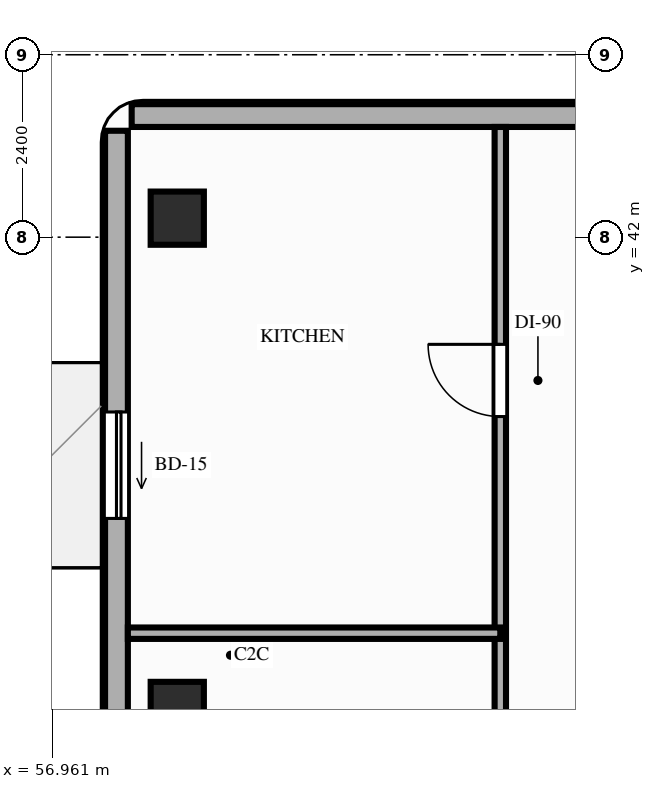
"""IFC4 building model, lengths in metres.
Left out: names, types, materials, properties, quantities, classifications, styles, units other than length and angle.
Written with IfcOpenShell. Run it as: python <this file> out.ifc"""

import sys

from ifc_helpers import new_model, si_unit, direction, frame, frame_2d, origin, origin_2d, place, context, subcontext, project, spatial, rectangle, extrude, element, fill, save


model = new_model("IFC4")
c1 = context("Model", 3, precision=1e-05, world=origin(), true_north=direction((0.0, 1.0)))
c2 = subcontext(c1, "Body", "Model", "MODEL_VIEW")
j1 = project(units=[si_unit("LENGTHUNIT", "METRE"), si_unit("PLANEANGLEUNIT", "RADIAN")], contexts=[c1])
p1 = place(None, origin())
s1 = spatial("IfcSite", under=j1, at=p1, CompositionType="ELEMENT")
p2 = place(p1, origin())
s2 = spatial("IfcBuilding", under=s1, at=p2, CompositionType="ELEMENT")
p3 = place(p2, frame((0.0, 0.0, 89.8)))
s3 = spatial("IfcBuildingStorey", under=s2, at=p3, CompositionType="ELEMENT", Elevation=89.8)
for number, where, z_axis, x_axis in (
    (1, (58.6, 35.8, 0.0), (0.0, 0.0, 1.0), (1.0, 0.0, 0.0)),
    (2, (58.6, 42.25, 0.0), (0.0, 0.0, 1.0), (1.0, 0.0, 0.0)),
):
    element("IfcColumn", number, at=place(p3, frame(where, z_axis=z_axis, x_axis=x_axis)), inside=s3, PredefinedType="COLUMN", context=c2, shape_type="SweptSolid", body=[
        extrude(rectangle(XDim=0.7, YDim=0.7, at=origin_2d()), origin(), (0.0, 0.0, 1.0), 3.2),
    ])
p4 = place(p3, frame((57.8, 43.4, 0.0), z_axis=(0.0, 0.0, 1.0), x_axis=(0.0, -1.0, 0.0)))
e3 = element("IfcWall", 3, at=p4, inside=s3, PredefinedType="STANDARD", context=c2, shape_type="SweptSolid", body=[
    extrude(rectangle(XDim=22.6, YDim=0.3, at=frame_2d((11.3, 0.0))), origin(), (0.0, 0.0, 1.0), 2.73),
])
p5 = place(p4, frame((3.7, 0.0, 0.0)))
e4 = element("IfcOpeningElement", 4, at=p5, cuts=e3, PredefinedType="OPENING", context=c2, shape_type="SweptSolid", body=[
    extrude(rectangle(XDim=1.4, YDim=2.1, at=frame_2d((0.7, 1.05))), frame((0.0, 0.16, 0.0), z_axis=(0.0, -1.0, 0.0), x_axis=(1.0, 0.0, 0.0)), (0.0, 0.0, 1.0), 0.32),
])
p6 = place(p3, frame((72.8, 43.6, 0.0), z_axis=(0.0, 0.0, 1.0), x_axis=(-1.0, 0.0, 0.0)))
e5 = element("IfcWall", 5, at=p6, inside=s3, PredefinedType="STANDARD", context=c2, shape_type="SweptSolid", body=[
    extrude(rectangle(XDim=14.8, YDim=0.3, at=frame_2d((7.4, 0.0))), origin(), (0.0, 0.0, 1.0), 3.02),
])
p7 = place(p3, frame((62.85, 20.75, 0.0), z_axis=(0.0, 0.0, 1.0), x_axis=(0.0, 1.0, 0.0)))
e6 = element("IfcWall", 6, at=p7, inside=s3, PredefinedType="PARTITIONING", context=c2, shape_type="SweptSolid", body=[
    extrude(rectangle(XDim=22.7, YDim=0.15, at=frame_2d((11.35, 0.0))), origin(), (0.0, 0.0, 1.0), 2.61),
])
p8 = place(p7, frame((0.73, 0.0, 0.0)))
e7 = element("IfcOpeningElement", 7, at=p8, cuts=e6, PredefinedType="OPENING", context=c2, shape_type="SweptSolid", body=[
    extrude(rectangle(XDim=0.85, YDim=2.1, at=frame_2d((0.425, 1.05))), frame((0.0, 0.085, 0.0), z_axis=(0.0, -1.0, 0.0), x_axis=(1.0, 0.0, 0.0)), (0.0, 0.0, 1.0), 0.17),
])
p9 = place(p7, frame((3.43, 0.0, 0.0)))
e8 = element("IfcOpeningElement", 8, at=p9, cuts=e6, PredefinedType="OPENING", context=c2, shape_type="SweptSolid", body=[
    extrude(rectangle(XDim=0.95, YDim=2.1, at=frame_2d((0.475, 1.05))), frame((0.0, 0.085, 0.0), z_axis=(0.0, -1.0, 0.0), x_axis=(1.0, 0.0, 0.0)), (0.0, 0.0, 1.0), 0.17),
])
p10 = place(p7, frame((8.15, 0.0, 0.0)))
e9 = element("IfcOpeningElement", 9, at=p10, cuts=e6, PredefinedType="OPENING", context=c2, shape_type="SweptSolid", body=[
    extrude(rectangle(XDim=0.95, YDim=2.15, at=frame_2d((0.475, 1.075))), frame((0.0, 0.085, 0.0), z_axis=(0.0, -1.0, 0.0), x_axis=(1.0, 0.0, 0.0)), (0.0, 0.0, 1.0), 0.17),
])
p11 = place(p7, frame((18.89, 0.0, 0.0)))
e10 = element("IfcOpeningElement", 10, at=p11, cuts=e6, PredefinedType="OPENING", context=c2, shape_type="SweptSolid", body=[
    extrude(rectangle(XDim=0.95, YDim=2.15, at=frame_2d((0.475, 1.075))), frame((0.0, 0.085, 0.0), z_axis=(0.0, -1.0, 0.0), x_axis=(1.0, 0.0, 0.0)), (0.0, 0.0, 1.0), 0.17),
])
p12 = place(p3, frame((57.95, 36.79, 0.0), z_axis=(0.0, 0.0, 1.0), x_axis=(1.0, 0.0, 0.0)))
e11 = element("IfcWall", 11, at=p12, inside=s3, PredefinedType="PARTITIONING", context=c2, shape_type="SweptSolid", body=[
    extrude(rectangle(XDim=4.9, YDim=0.15, at=frame_2d((2.45, 0.0))), origin(), (0.0, 0.0, 1.0), 2.61),
])
p13 = place(p5, origin())
e12 = element("IfcDoor", 12, at=p13, inside=s3, OperationType="SLIDING_TO_RIGHT", PredefinedType="DOOR", context=c2, shape_type="SweptSolid", body=[
    extrude(rectangle(XDim=1.4, YDim=2.1, at=frame_2d((0.7, 1.05))), frame((0.0, 0.025, 0.0), z_axis=(0.0, -1.0, 0.0), x_axis=(1.0, 0.0, 0.0)), (0.0, 0.0, 1.0), 0.05),
])
fill(e4, e12)
p14 = place(p11, origin())
e13 = element("IfcDoor", 13, at=p14, inside=s3, OperationType="SINGLE_SWING_RIGHT", PredefinedType="DOOR", context=c2, shape_type="SweptSolid", body=[
    extrude(rectangle(XDim=0.95, YDim=2.15, at=frame_2d((0.475, 1.075))), frame((0.0, 0.025, 0.0), z_axis=(0.0, -1.0, 0.0), x_axis=(1.0, 0.0, 0.0)), (0.0, 0.0, 1.0), 0.05),
])
fill(e10, e13)
save(model, sys.argv[1])
